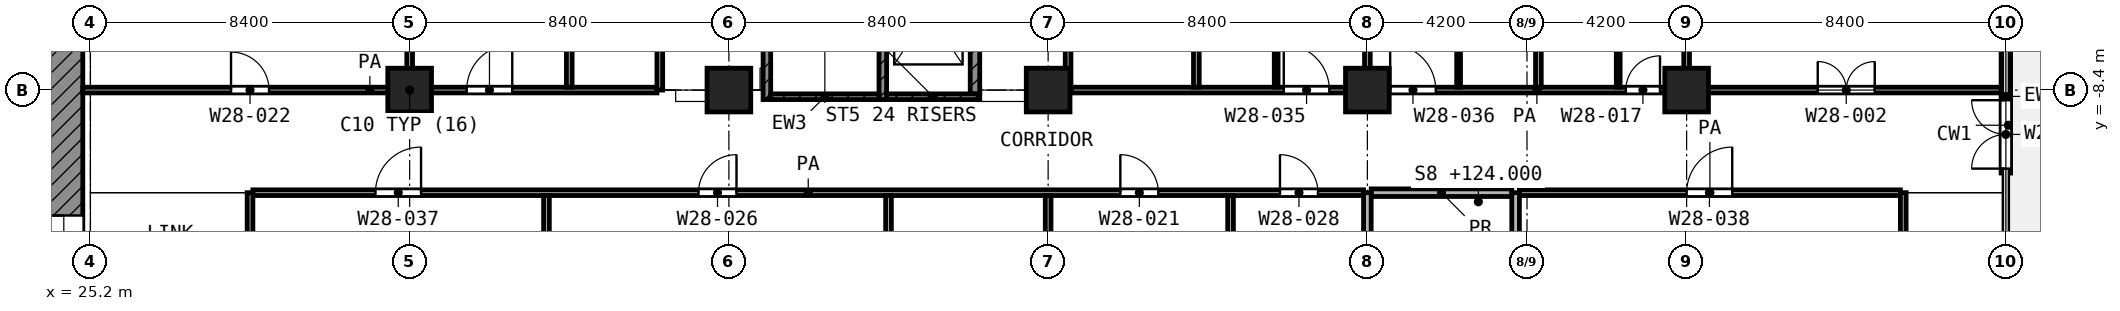
"""IFC4 building model, lengths in metres.
Left out: names, types, materials, properties, quantities, classifications, styles, units other than length and angle.
Written with IfcOpenShell. Run it as: python <this file> out.ifc"""

import sys

from ifc_helpers import new_model, si_unit, direction, frame, frame_2d, origin, origin_2d, place, context, subcontext, project, spatial, rectangle, extrude, element, fill, save


model = new_model("IFC4")
c1 = context("Model", 3, precision=1e-05, world=origin(), true_north=direction((0.0, 1.0)))
c2 = subcontext(c1, "Body", "Model", "MODEL_VIEW")
j1 = project(units=[si_unit("LENGTHUNIT", "METRE"), si_unit("PLANEANGLEUNIT", "RADIAN")], contexts=[c1])
p1 = place(None, origin())
s1 = spatial("IfcSite", under=j1, at=p1, CompositionType="ELEMENT")
p2 = place(p1, origin())
s2 = spatial("IfcBuilding", under=s1, at=p2, CompositionType="ELEMENT")
p3 = place(p2, frame((0.0, 0.0, 124.0)))
s3 = spatial("IfcBuildingStorey", under=s2, at=p3, CompositionType="ELEMENT", Elevation=124.0)
for number, where, z_axis, x_axis in (
    (1, (33.6, -8.4, 0.0), (0.0, 0.0, 1.0), (1.0, 0.0, 0.0)),
    (2, (42.0, -8.4, 0.0), (0.0, 0.0, 1.0), (1.0, 0.0, 0.0)),
    (3, (50.4, -8.4, 0.0), (0.0, 0.0, 1.0), (1.0, 0.0, 0.0)),
    (4, (58.8, -8.4, 0.0), (0.0, 0.0, 1.0), (1.0, 0.0, 0.0)),
    (5, (67.2, -8.4, 0.0), (0.0, 0.0, 1.0), (1.0, 0.0, 0.0)),
):
    element("IfcColumn", number, at=place(p3, frame(where, z_axis=z_axis, x_axis=x_axis)), inside=s3, PredefinedType="COLUMN", context=c2, shape_type="SweptSolid", body=[
        extrude(rectangle(XDim=1.15, YDim=1.15, at=origin_2d()), origin(), (0.0, 0.0, 1.0), 4.2),
    ])
p4 = place(p3, frame((75.6, -10.583, 0.0), z_axis=(0.0, 0.0, 1.0), x_axis=(0.0, 1.0, 0.0)))
e6 = element("IfcWall", 6, at=p4, inside=s3, PredefinedType="SOLIDWALL", context=c2, shape_type="SweptSolid", body=[
    extrude(rectangle(XDim=4.033, YDim=0.25, at=frame_2d((2.017, 0.0))), origin(), (0.0, 0.0, 1.0), 3.48),
])
p5 = place(p4, frame((0.117, 0.0, 0.0)))
e7 = element("IfcOpeningElement", 7, at=p5, cuts=e6, PredefinedType="OPENING", context=c2, shape_type="SweptSolid", body=[
    extrude(rectangle(XDim=1.8, YDim=2.1, at=frame_2d((0.9, 1.05))), frame((0.0, 0.135, 0.0), z_axis=(0.0, -1.0, 0.0), x_axis=(1.0, 0.0, 0.0)), (0.0, 0.0, 1.0), 0.27),
])
p6 = place(p3, frame((24.5, -24.0, 0.0), z_axis=(0.0, 0.0, 1.0), x_axis=(0.0, 1.0, 0.0)))
e8 = element("IfcWall", 8, at=p6, inside=s3, PredefinedType="SHEAR", context=c2, shape_type="SweptSolid", body=[
    extrude(rectangle(XDim=18.6, YDim=1.0, at=frame_2d((9.3, 0.0))), origin(), (0.0, 0.0, 1.0), 3.6),
])
p7 = place(p6, frame((10.5, 0.0, 0.0)))
e9 = element("IfcOpeningElement", 9, at=p7, cuts=e8, PredefinedType="OPENING", context=c2, shape_type="SweptSolid", body=[
    extrude(rectangle(XDim=1.8, YDim=2.1, at=frame_2d((0.9, 1.05))), frame((0.0, 0.51, 0.0), z_axis=(0.0, -1.0, 0.0), x_axis=(1.0, 0.0, 0.0)), (0.0, 0.0, 1.0), 1.02),
])
p8 = place(p3, frame((43.0, -8.65, 0.0), z_axis=(0.0, 0.0, 1.0), x_axis=(0.0, 1.0, 0.0)))
e10 = element("IfcWall", 10, at=p8, inside=s3, PredefinedType="SHEAR", context=c2, shape_type="SweptSolid", body=[
    extrude(rectangle(XDim=8.35, YDim=0.2, at=frame_2d((4.175, 0.0))), origin(), (0.0, 0.0, 1.0), 3.6),
])
p9 = place(p8, frame((7.0, 0.0, 0.0)))
e11 = element("IfcOpeningElement", 11, at=p9, cuts=e10, PredefinedType="OPENING", context=c2, shape_type="SweptSolid", body=[
    extrude(rectangle(XDim=1.1, YDim=2.1, at=frame_2d((0.55, 1.05))), frame((0.0, 0.11, 0.0), z_axis=(0.0, -1.0, 0.0), x_axis=(1.0, 0.0, 0.0)), (0.0, 0.0, 1.0), 0.22),
])
p10 = place(p3, frame((46.05, -8.65, 0.0), z_axis=(0.0, 0.0, 1.0), x_axis=(0.0, 1.0, 0.0)))
e12 = element("IfcWall", 12, at=p10, inside=s3, PredefinedType="SHEAR", context=c2, shape_type="SweptSolid", body=[
    extrude(rectangle(XDim=8.35, YDim=0.2, at=frame_2d((4.175, 0.0))), origin(), (0.0, 0.0, 1.0), 3.6),
])
p11 = place(p10, frame((7.0, 0.0, 0.0)))
e13 = element("IfcOpeningElement", 13, at=p11, cuts=e12, PredefinedType="OPENING", context=c2, shape_type="SweptSolid", body=[
    extrude(rectangle(XDim=1.1, YDim=2.1, at=frame_2d((0.55, 1.05))), frame((0.0, 0.11, 0.0), z_axis=(0.0, -1.0, 0.0), x_axis=(1.0, 0.0, 0.0)), (0.0, 0.0, 1.0), 0.22),
])
p12 = place(p3, frame((43.1, -8.575, 0.0), z_axis=(0.0, 0.0, 1.0), x_axis=(1.0, 0.0, 0.0)))
e14 = element("IfcWall", 14, at=p12, inside=s3, PredefinedType="SHEAR", context=c2, shape_type="SweptSolid", body=[
    extrude(rectangle(XDim=2.85, YDim=0.15, at=frame_2d((1.425, 0.0))), origin(), (0.0, 0.0, 1.0), 3.6),
])
p13 = place(p3, frame((46.15, -8.575, 0.0), z_axis=(0.0, 0.0, 1.0), x_axis=(1.0, 0.0, 0.0)))
e15 = element("IfcWall", 15, at=p13, inside=s3, PredefinedType="SHEAR", context=c2, shape_type="SweptSolid", body=[
    extrude(rectangle(XDim=2.45, YDim=0.15, at=frame_2d((1.225, 0.0))), origin(), (0.0, 0.0, 1.0), 3.6),
])
p14 = place(p3, frame((48.475, -8.5, 0.0), z_axis=(0.0, 0.0, 1.0), x_axis=(0.0, 1.0, 0.0)))
e16 = element("IfcWall", 16, at=p14, inside=s3, PredefinedType="SHEAR", context=c2, shape_type="SweptSolid", body=[
    extrude(rectangle(XDim=3.475, YDim=0.25, at=frame_2d((1.738, 0.0))), origin(), (0.0, 0.0, 1.0), 3.6),
])
for number, where, z_axis, x_axis in (
    (17, (56.4, -8.325, 0.0), (0.0, 0.0, 1.0), (0.0, 1.0, 0.0)),
    (18, (61.2, -8.325, 0.0), (0.0, 0.0, 1.0), (0.0, 1.0, 0.0)),
    (19, (65.4, -8.325, 0.0), (0.0, 0.0, 1.0), (0.0, 1.0, 0.0)),
):
    element("IfcWall", number, at=place(p3, frame(where, z_axis=z_axis, x_axis=x_axis)), inside=s3, PredefinedType="PARTITIONING", context=c2, shape_type="SweptSolid", body=[
        extrude(rectangle(XDim=2.625, YDim=0.1, at=frame_2d((1.312, 0.0))), origin(), (0.0, 0.0, 1.0), 3.6),
    ])
p15 = place(p3, frame((29.475, -11.1, 0.0), z_axis=(0.0, 0.0, 1.0), x_axis=(1.0, 0.0, 0.0)))
e20 = element("IfcWall", 20, at=p15, inside=s3, PredefinedType="PARTITIONING", context=c2, shape_type="SweptSolid", body=[
    extrude(rectangle(XDim=29.225, YDim=0.15, at=frame_2d((14.612, 0.0))), origin(), (0.0, 0.0, 1.0), 3.6),
])
p16 = place(p15, frame((3.225, 0.0, 0.0)))
e21 = element("IfcOpeningElement", 21, at=p16, cuts=e20, PredefinedType="OPENING", context=c2, shape_type="SweptSolid", body=[
    extrude(rectangle(XDim=1.2, YDim=2.1, at=frame_2d((0.6, 1.05))), frame((0.0, 0.085, 0.0), z_axis=(0.0, -1.0, 0.0), x_axis=(1.0, 0.0, 0.0)), (0.0, 0.0, 1.0), 0.17),
])
p17 = place(p15, frame((11.725, 0.0, 0.0)))
e22 = element("IfcOpeningElement", 22, at=p17, cuts=e20, PredefinedType="OPENING", context=c2, shape_type="SweptSolid", body=[
    extrude(rectangle(XDim=1.0, YDim=2.1, at=frame_2d((0.5, 1.05))), frame((0.0, 0.085, 0.0), z_axis=(0.0, -1.0, 0.0), x_axis=(1.0, 0.0, 0.0)), (0.0, 0.0, 1.0), 0.17),
])
p18 = place(p15, frame((22.825, 0.0, 0.0)))
e23 = element("IfcOpeningElement", 23, at=p18, cuts=e20, PredefinedType="OPENING", context=c2, shape_type="SweptSolid", body=[
    extrude(rectangle(XDim=1.0, YDim=2.1, at=frame_2d((0.5, 1.05))), frame((0.0, 0.085, 0.0), z_axis=(0.0, -1.0, 0.0), x_axis=(1.0, 0.0, 0.0)), (0.0, 0.0, 1.0), 0.17),
])
p19 = place(p15, frame((27.025, 0.0, 0.0)))
e24 = element("IfcOpeningElement", 24, at=p19, cuts=e20, PredefinedType="OPENING", context=c2, shape_type="SweptSolid", body=[
    extrude(rectangle(XDim=1.0, YDim=2.1, at=frame_2d((0.5, 1.05))), frame((0.0, 0.085, 0.0), z_axis=(0.0, -1.0, 0.0), x_axis=(1.0, 0.0, 0.0)), (0.0, 0.0, 1.0), 0.17),
])
p20 = place(p3, frame((62.8, -11.1, 0.0), z_axis=(0.0, 0.0, 1.0), x_axis=(1.0, 0.0, 0.0)))
e25 = element("IfcWall", 25, at=p20, inside=s3, PredefinedType="PARTITIONING", context=c2, shape_type="SweptSolid", body=[
    extrude(rectangle(XDim=10.025, YDim=0.15, at=frame_2d((5.012, 0.0))), origin(), (0.0, 0.0, 1.0), 3.6),
])
p21 = place(p20, frame((4.4, 0.0, 0.0)))
e26 = element("IfcOpeningElement", 26, at=p21, cuts=e25, PredefinedType="OPENING", context=c2, shape_type="SweptSolid", body=[
    extrude(rectangle(XDim=1.2, YDim=2.1, at=frame_2d((0.6, 1.05))), frame((0.0, 0.085, 0.0), z_axis=(0.0, -1.0, 0.0), x_axis=(1.0, 0.0, 0.0)), (0.0, 0.0, 1.0), 0.17),
])
p22 = place(p3, frame((25.0, -8.4, 0.0), z_axis=(0.0, 0.0, 1.0), x_axis=(1.0, 0.0, 0.0)))
e27 = element("IfcWall", 27, at=p22, inside=s3, PredefinedType="PARTITIONING", context=c2, shape_type="SweptSolid", body=[
    extrude(rectangle(XDim=15.107, YDim=0.15, at=frame_2d((7.553, 0.0))), origin(), (0.0, 0.0, 1.0), 3.6),
])
p23 = place(p22, frame((3.9, 0.0, 0.0)))
e28 = element("IfcOpeningElement", 28, at=p23, cuts=e27, PredefinedType="OPENING", context=c2, shape_type="SweptSolid", body=[
    extrude(rectangle(XDim=1.0, YDim=2.1, at=frame_2d((0.5, 1.05))), frame((0.0, 0.085, 0.0), z_axis=(0.0, -1.0, 0.0), x_axis=(1.0, 0.0, 0.0)), (0.0, 0.0, 1.0), 0.17),
])
p24 = place(p22, frame((10.1, 0.0, 0.0)))
e29 = element("IfcOpeningElement", 29, at=p24, cuts=e27, PredefinedType="OPENING", context=c2, shape_type="SweptSolid", body=[
    extrude(rectangle(XDim=1.2, YDim=2.1, at=frame_2d((0.6, 1.05))), frame((0.0, 0.085, 0.0), z_axis=(0.0, -1.0, 0.0), x_axis=(1.0, 0.0, 0.0)), (0.0, 0.0, 1.0), 0.17),
])
p25 = place(p3, frame((51.0, -8.4, 0.0), z_axis=(0.0, 0.0, 1.0), x_axis=(1.0, 0.0, 0.0)))
e30 = element("IfcWall", 30, at=p25, inside=s3, PredefinedType="PARTITIONING", context=c2, shape_type="SweptSolid", body=[
    extrude(rectangle(XDim=24.52, YDim=0.15, at=frame_2d((12.26, 0.0))), origin(), (0.0, 0.0, 1.0), 3.6),
])
p26 = place(p25, frame((5.6, 0.0, 0.0)))
e31 = element("IfcOpeningElement", 31, at=p26, cuts=e30, PredefinedType="OPENING", context=c2, shape_type="SweptSolid", body=[
    extrude(rectangle(XDim=1.2, YDim=2.1, at=frame_2d((0.6, 1.05))), frame((0.0, 0.085, 0.0), z_axis=(0.0, -1.0, 0.0), x_axis=(1.0, 0.0, 0.0)), (0.0, 0.0, 1.0), 0.17),
])
p27 = place(p25, frame((8.4, 0.0, 0.0)))
e32 = element("IfcOpeningElement", 32, at=p27, cuts=e30, PredefinedType="OPENING", context=c2, shape_type="SweptSolid", body=[
    extrude(rectangle(XDim=1.2, YDim=2.1, at=frame_2d((0.6, 1.05))), frame((0.0, 0.085, 0.0), z_axis=(0.0, -1.0, 0.0), x_axis=(1.0, 0.0, 0.0)), (0.0, 0.0, 1.0), 0.17),
])
p28 = place(p25, frame((14.6, 0.0, 0.0)))
e33 = element("IfcOpeningElement", 33, at=p28, cuts=e30, PredefinedType="OPENING", context=c2, shape_type="SweptSolid", body=[
    extrude(rectangle(XDim=0.9, YDim=2.1, at=frame_2d((0.45, 1.05))), frame((0.0, 0.085, 0.0), z_axis=(0.0, -1.0, 0.0), x_axis=(1.0, 0.0, 0.0)), (0.0, 0.0, 1.0), 0.17),
])
p29 = place(p25, frame((19.65, 0.0, 0.0)))
e34 = element("IfcOpeningElement", 34, at=p29, cuts=e30, PredefinedType="OPENING", context=c2, shape_type="SweptSolid", body=[
    extrude(rectangle(XDim=1.5, YDim=2.1, at=frame_2d((0.75, 1.05))), frame((0.0, 0.085, 0.0), z_axis=(0.0, -1.0, 0.0), x_axis=(1.0, 0.0, 0.0)), (0.0, 0.0, 1.0), 0.17),
])
p30 = place(p3, frame((29.4, -14.1, 0.0), z_axis=(0.0, 0.0, 1.0), x_axis=(0.0, 1.0, 0.0)))
e35 = element("IfcWall", 35, at=p30, inside=s3, PredefinedType="PARTITIONING", context=c2, shape_type="SweptSolid", body=[
    extrude(rectangle(XDim=3.0, YDim=0.15, at=frame_2d((1.5, 0.0))), origin(), (0.0, 0.0, 1.0), 3.6),
])
p31 = place(p3, frame((33.6, -8.325, 0.0), z_axis=(0.0, 0.0, 1.0), x_axis=(0.0, 1.0, 0.0)))
e36 = element("IfcWall", 36, at=p31, inside=s3, PredefinedType="PARTITIONING", context=c2, shape_type="SweptSolid", body=[
    extrude(rectangle(XDim=8.322, YDim=0.15, at=frame_2d((4.161, 0.0))), origin(), (0.0, 0.0, 1.0), 3.6),
])
p32 = place(p3, frame((37.2, -14.025, 0.0), z_axis=(0.0, 0.0, 1.0), x_axis=(0.0, 1.0, 0.0)))
e37 = element("IfcWall", 37, at=p32, inside=s3, PredefinedType="PARTITIONING", context=c2, shape_type="SweptSolid", body=[
    extrude(rectangle(XDim=2.85, YDim=0.15, at=frame_2d((1.425, 0.0))), origin(), (0.0, 0.0, 1.0), 3.6),
])
p33 = place(p3, frame((37.8, -8.325, 0.0), z_axis=(0.0, 0.0, 1.0), x_axis=(0.0, 1.0, 0.0)))
e38 = element("IfcWall", 38, at=p33, inside=s3, PredefinedType="PARTITIONING", context=c2, shape_type="SweptSolid", body=[
    extrude(rectangle(XDim=8.322, YDim=0.15, at=frame_2d((4.161, 0.0))), origin(), (0.0, 0.0, 1.0), 3.6),
])
p34 = place(p3, frame((40.182, -8.4, 0.0), z_axis=(0.0, 0.0, 1.0), x_axis=(0.0, 1.0, 0.0)))
e39 = element("IfcWall", 39, at=p34, inside=s3, PredefinedType="PARTITIONING", context=c2, shape_type="SweptSolid", body=[
    extrude(rectangle(XDim=8.05, YDim=0.15, at=frame_2d((4.025, 0.0))), origin(), (0.0, 0.0, 1.0), 3.6),
])
p35 = place(p34, frame((3.525, 0.0, 0.0)))
e40 = element("IfcOpeningElement", 40, at=p35, cuts=e39, PredefinedType="OPENING", context=c2, shape_type="SweptSolid", body=[
    extrude(rectangle(XDim=1.0, YDim=2.1, at=frame_2d((0.5, 1.05))), frame((0.0, 0.085, 0.0), z_axis=(0.0, -1.0, 0.0), x_axis=(1.0, 0.0, 0.0)), (0.0, 0.0, 1.0), 0.17),
])
for number, where, z_axis, x_axis in (
    (41, (46.2, -14.025, 0.0), (0.0, 0.0, 1.0), (0.0, 1.0, 0.0)),
    (42, (50.4, -14.025, 0.0), (0.0, 0.0, 1.0), (0.0, 1.0, 0.0)),
):
    element("IfcWall", number, at=place(p3, frame(where, z_axis=z_axis, x_axis=x_axis)), inside=s3, PredefinedType="PARTITIONING", context=c2, shape_type="SweptSolid", body=[
        extrude(rectangle(XDim=2.85, YDim=0.15, at=frame_2d((1.425, 0.0))), origin(), (0.0, 0.0, 1.0), 3.6),
    ])
p36 = place(p3, frame((50.925, -8.4, 0.0), z_axis=(0.0, 0.0, 1.0), x_axis=(0.0, 1.0, 0.0)))
e43 = element("IfcWall", 43, at=p36, inside=s3, PredefinedType="PARTITIONING", context=c2, shape_type="SweptSolid", body=[
    extrude(rectangle(XDim=6.55, YDim=0.15, at=frame_2d((3.275, 0.0))), origin(), (0.0, 0.0, 1.0), 3.6),
])
p37 = place(p36, frame((2.775, 0.0, 0.0)))
e44 = element("IfcOpeningElement", 44, at=p37, cuts=e43, PredefinedType="OPENING", context=c2, shape_type="SweptSolid", body=[
    extrude(rectangle(XDim=1.0, YDim=2.1, at=frame_2d((0.5, 1.05))), frame((0.0, 0.085, 0.0), z_axis=(0.0, -1.0, 0.0), x_axis=(1.0, 0.0, 0.0)), (0.0, 0.0, 1.0), 0.17),
])
p38 = place(p3, frame((54.3, -8.325, 0.0), z_axis=(0.0, 0.0, 1.0), x_axis=(0.0, 1.0, 0.0)))
e45 = element("IfcWall", 45, at=p38, inside=s3, PredefinedType="PARTITIONING", context=c2, shape_type="SweptSolid", body=[
    extrude(rectangle(XDim=8.25, YDim=0.15, at=frame_2d((4.125, 0.0))), origin(), (0.0, 0.0, 1.0), 3.6),
])
p39 = place(p3, frame((55.2, -14.025, 0.0), z_axis=(0.0, 0.0, 1.0), x_axis=(0.0, 1.0, 0.0)))
e46 = element("IfcWall", 46, at=p39, inside=s3, PredefinedType="PARTITIONING", context=c2, shape_type="SweptSolid", body=[
    extrude(rectangle(XDim=2.85, YDim=0.15, at=frame_2d((1.425, 0.0))), origin(), (0.0, 0.0, 1.0), 3.6),
])
p40 = place(p3, frame((58.8, -8.325, 0.0), z_axis=(0.0, 0.0, 1.0), x_axis=(0.0, 1.0, 0.0)))
e47 = element("IfcWall", 47, at=p40, inside=s3, PredefinedType="PARTITIONING", context=c2, shape_type="SweptSolid", body=[
    extrude(rectangle(XDim=8.25, YDim=0.15, at=frame_2d((4.125, 0.0))), origin(), (0.0, 0.0, 1.0), 3.6),
])
p41 = place(p3, frame((63.3, -8.325, 0.0), z_axis=(0.0, 0.0, 1.0), x_axis=(0.0, 1.0, 0.0)))
e48 = element("IfcWall", 48, at=p41, inside=s3, PredefinedType="PARTITIONING", context=c2, shape_type="SweptSolid", body=[
    extrude(rectangle(XDim=8.325, YDim=0.15, at=frame_2d((4.163, 0.0))), origin(), (0.0, 0.0, 1.0), 3.6),
])
p42 = place(p3, frame((67.2, -8.325, 0.0), z_axis=(0.0, 0.0, 1.0), x_axis=(0.0, 1.0, 0.0)))
e49 = element("IfcWall", 49, at=p42, inside=s3, PredefinedType="PARTITIONING", context=c2, shape_type="SweptSolid", body=[
    extrude(rectangle(XDim=8.323, YDim=0.15, at=frame_2d((4.162, 0.0))), origin(), (0.0, 0.0, 1.0), 3.6),
])
p43 = place(p3, frame((72.9, -14.1, 0.0), z_axis=(0.0, 0.0, 1.0), x_axis=(0.0, 1.0, 0.0)))
e50 = element("IfcWall", 50, at=p43, inside=s3, PredefinedType="PARTITIONING", context=c2, shape_type="SweptSolid", body=[
    extrude(rectangle(XDim=3.0, YDim=0.15, at=frame_2d((1.5, 0.0))), origin(), (0.0, 0.0, 1.0), 3.6),
])
p44 = place(p3, frame((58.9, -11.1, 0.0), z_axis=(0.0, 0.0, 1.0), x_axis=(1.0, 0.0, 0.0)))
e51 = element("IfcWall", 51, at=p44, inside=s3, PredefinedType="PARTITIONING", context=c2, shape_type="SweptSolid", body=[
    extrude(rectangle(XDim=3.7, YDim=0.2, at=frame_2d((1.85, 0.0))), origin(), (0.0, 0.0, 1.0), 3.6),
])
for number, where, z_axis, x_axis in (
    (52, (58.8, -14.1, 0.0), (0.0, 0.0, 1.0), (0.0, 1.0, 0.0)),
    (53, (62.7, -14.1, 0.0), (0.0, 0.0, 1.0), (0.0, 1.0, 0.0)),
):
    element("IfcWall", number, at=place(p3, frame(where, z_axis=z_axis, x_axis=x_axis)), inside=s3, PredefinedType="PARTITIONING", context=c2, shape_type="SweptSolid", body=[
        extrude(rectangle(XDim=3.0, YDim=0.2, at=frame_2d((1.5, 0.0))), origin(), (0.0, 0.0, 1.0), 3.6),
    ])
p45 = place(p5, origin())
e54 = element("IfcDoor", 54, at=p45, inside=s3, OperationType="DOUBLE_DOOR_SINGLE_SWING", PredefinedType="DOOR", context=c2, shape_type="SweptSolid", body=[
    extrude(rectangle(XDim=1.8, YDim=2.1, at=frame_2d((0.9, 1.05))), frame((0.0, 0.025, 0.0), z_axis=(0.0, -1.0, 0.0), x_axis=(1.0, 0.0, 0.0)), (0.0, 0.0, 1.0), 0.05),
])
fill(e7, e54)
p46 = place(p7, origin())
e55 = element("IfcDoor", 55, at=p46, inside=s3, OperationType="DOUBLE_DOOR_SINGLE_SWING", PredefinedType="DOOR", context=c2, shape_type="SweptSolid", body=[
    extrude(rectangle(XDim=1.8, YDim=2.1, at=frame_2d((0.9, 1.05))), frame((0.0, 0.025, 0.0), z_axis=(0.0, -1.0, 0.0), x_axis=(1.0, 0.0, 0.0)), (0.0, 0.0, 1.0), 0.05),
])
fill(e9, e55)
p47 = place(p23, origin())
e56 = element("IfcDoor", 56, at=p47, inside=s3, OperationType="SINGLE_SWING_LEFT", PredefinedType="DOOR", context=c2, shape_type="SweptSolid", body=[
    extrude(rectangle(XDim=1.0, YDim=2.1, at=frame_2d((0.5, 1.05))), frame((0.0, 0.025, 0.0), z_axis=(0.0, -1.0, 0.0), x_axis=(1.0, 0.0, 0.0)), (0.0, 0.0, 1.0), 0.05),
])
fill(e28, e56)
p48 = place(p24, origin())
e57 = element("IfcDoor", 57, at=p48, inside=s3, OperationType="SINGLE_SWING_RIGHT", PredefinedType="DOOR", context=c2, shape_type="SweptSolid", body=[
    extrude(rectangle(XDim=1.2, YDim=2.1, at=frame_2d((0.6, 1.05))), frame((0.0, 0.025, 0.0), z_axis=(0.0, -1.0, 0.0), x_axis=(1.0, 0.0, 0.0)), (0.0, 0.0, 1.0), 0.05),
])
fill(e29, e57)
p49 = place(p26, origin())
e58 = element("IfcDoor", 58, at=p49, inside=s3, OperationType="SINGLE_SWING_LEFT", PredefinedType="DOOR", context=c2, shape_type="SweptSolid", body=[
    extrude(rectangle(XDim=1.2, YDim=2.1, at=frame_2d((0.6, 1.05))), frame((0.0, 0.025, 0.0), z_axis=(0.0, -1.0, 0.0), x_axis=(1.0, 0.0, 0.0)), (0.0, 0.0, 1.0), 0.05),
])
fill(e31, e58)
p50 = place(p27, origin())
e59 = element("IfcDoor", 59, at=p50, inside=s3, OperationType="SINGLE_SWING_LEFT", PredefinedType="DOOR", context=c2, shape_type="SweptSolid", body=[
    extrude(rectangle(XDim=1.2, YDim=2.1, at=frame_2d((0.6, 1.05))), frame((0.0, 0.025, 0.0), z_axis=(0.0, -1.0, 0.0), x_axis=(1.0, 0.0, 0.0)), (0.0, 0.0, 1.0), 0.05),
])
fill(e32, e59)
p51 = place(p28, origin())
e60 = element("IfcDoor", 60, at=p51, inside=s3, OperationType="SINGLE_SWING_RIGHT", PredefinedType="DOOR", context=c2, shape_type="SweptSolid", body=[
    extrude(rectangle(XDim=0.9, YDim=2.1, at=frame_2d((0.45, 1.05))), frame((0.0, 0.025, 0.0), z_axis=(0.0, -1.0, 0.0), x_axis=(1.0, 0.0, 0.0)), (0.0, 0.0, 1.0), 0.05),
])
fill(e33, e60)
p52 = place(p29, origin())
e61 = element("IfcDoor", 61, at=p52, inside=s3, OperationType="DOUBLE_DOOR_SINGLE_SWING", PredefinedType="DOOR", context=c2, shape_type="SweptSolid", body=[
    extrude(rectangle(XDim=1.5, YDim=2.1, at=frame_2d((0.75, 1.05))), frame((0.0, 0.025, 0.0), z_axis=(0.0, -1.0, 0.0), x_axis=(1.0, 0.0, 0.0)), (0.0, 0.0, 1.0), 0.05),
])
fill(e34, e61)
p53 = place(p16, origin())
e62 = element("IfcDoor", 62, at=p53, inside=s3, OperationType="SINGLE_SWING_RIGHT", PredefinedType="DOOR", context=c2, shape_type="SweptSolid", body=[
    extrude(rectangle(XDim=1.2, YDim=2.1, at=frame_2d((0.6, 1.05))), frame((0.0, 0.025, 0.0), z_axis=(0.0, -1.0, 0.0), x_axis=(1.0, 0.0, 0.0)), (0.0, 0.0, 1.0), 0.05),
])
fill(e21, e62)
p54 = place(p17, origin())
e63 = element("IfcDoor", 63, at=p54, inside=s3, OperationType="SINGLE_SWING_RIGHT", PredefinedType="DOOR", context=c2, shape_type="SweptSolid", body=[
    extrude(rectangle(XDim=1.0, YDim=2.1, at=frame_2d((0.5, 1.05))), frame((0.0, 0.025, 0.0), z_axis=(0.0, -1.0, 0.0), x_axis=(1.0, 0.0, 0.0)), (0.0, 0.0, 1.0), 0.05),
])
fill(e22, e63)
p55 = place(p18, origin())
e64 = element("IfcDoor", 64, at=p55, inside=s3, OperationType="SINGLE_SWING_LEFT", PredefinedType="DOOR", context=c2, shape_type="SweptSolid", body=[
    extrude(rectangle(XDim=1.0, YDim=2.1, at=frame_2d((0.5, 1.05))), frame((0.0, 0.025, 0.0), z_axis=(0.0, -1.0, 0.0), x_axis=(1.0, 0.0, 0.0)), (0.0, 0.0, 1.0), 0.05),
])
fill(e23, e64)
p56 = place(p19, origin())
e65 = element("IfcDoor", 65, at=p56, inside=s3, OperationType="SINGLE_SWING_LEFT", PredefinedType="DOOR", context=c2, shape_type="SweptSolid", body=[
    extrude(rectangle(XDim=1.0, YDim=2.1, at=frame_2d((0.5, 1.05))), frame((0.0, 0.025, 0.0), z_axis=(0.0, -1.0, 0.0), x_axis=(1.0, 0.0, 0.0)), (0.0, 0.0, 1.0), 0.05),
])
fill(e24, e65)
p57 = place(p21, origin())
e66 = element("IfcDoor", 66, at=p57, inside=s3, OperationType="SINGLE_SWING_RIGHT", PredefinedType="DOOR", context=c2, shape_type="SweptSolid", body=[
    extrude(rectangle(XDim=1.2, YDim=2.1, at=frame_2d((0.6, 1.05))), frame((0.0, 0.025, 0.0), z_axis=(0.0, -1.0, 0.0), x_axis=(1.0, 0.0, 0.0)), (0.0, 0.0, 1.0), 0.05),
])
fill(e26, e66)
save(model, sys.argv[1])
